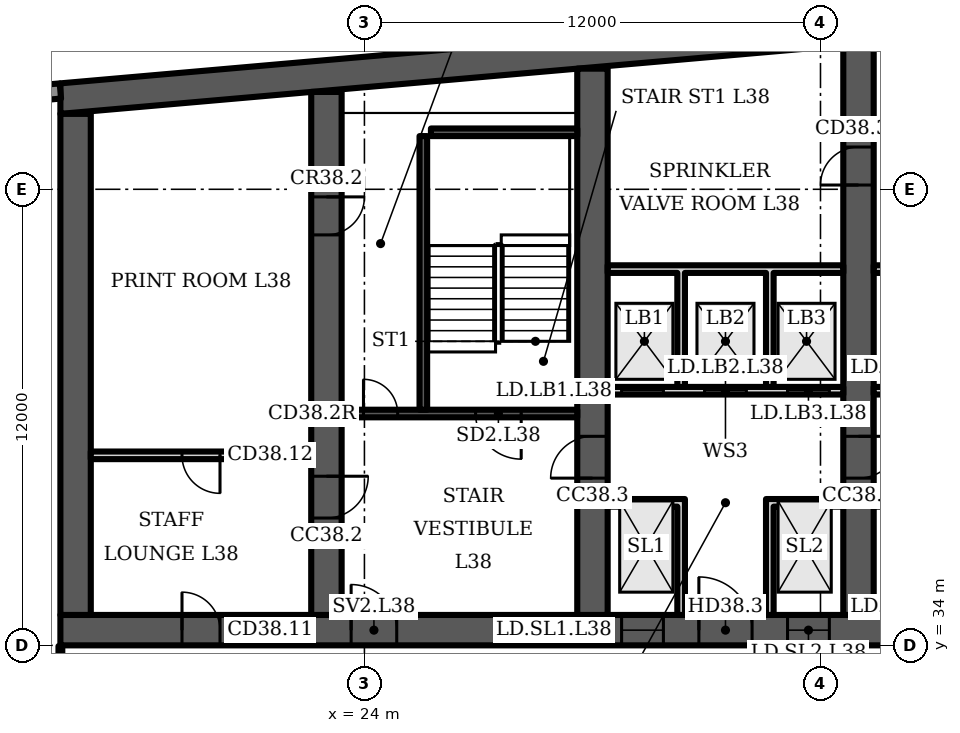
"""IFC4 building model, lengths in metres.
Left out: names, types, materials, properties, quantities, classifications, styles, units other than length and angle.
Written with IfcOpenShell. Run it as: python <this file> out.ifc"""

import sys

from ifc_helpers import new_model, si_unit, direction, frame, frame_2d, origin, place, context, subcontext, project, spatial, polyline, rectangle, outline, extrude, element, fill, save


model = new_model("IFC4")
c1 = context("Model", 3, precision=1e-05, world=origin(), true_north=direction((0.0, 1.0)))
c2 = subcontext(c1, "Body", "Model", "MODEL_VIEW")
j1 = project(units=[si_unit("LENGTHUNIT", "METRE"), si_unit("PLANEANGLEUNIT", "RADIAN")], contexts=[c1])
p1 = place(None, origin())
s1 = spatial("IfcSite", under=j1, at=p1, CompositionType="ELEMENT")
p2 = place(p1, origin())
s2 = spatial("IfcBuilding", under=s1, at=p2, CompositionType="ELEMENT")
p3 = place(p2, frame((0.0, 0.0, 159.1)))
s3 = spatial("IfcBuildingStorey", under=s2, at=p3, CompositionType="ELEMENT", Elevation=159.1)
p4 = place(p3, frame((0.0, 0.0, -0.0)))
e1 = element("IfcWall", 1, at=p4, inside=s3, PredefinedType="SHEAR", context=c2, shape_type="SweptSolid", body=[
    extrude(outline(polyline([(16.0, 47.984), (37.0, 49.822), (58.0, 47.984), (58.0, 48.787), (37.0, 50.625), (16.0, 48.787), (16.0, 47.984)])), origin(), (0.0, 0.0, 1.0), 3.6),
])
p5 = place(p3, frame((16.0, 34.4, 0.0), z_axis=(0.0, 0.0, 1.0), x_axis=(1.0, 0.0, 0.0)))
e2 = element("IfcWall", 2, at=p5, inside=s3, PredefinedType="SHEAR", context=c2, shape_type="SweptSolid", body=[
    extrude(rectangle(XDim=42.0, YDim=0.8, at=frame_2d((21.0, 0.0))), origin(), (0.0, 0.0, 1.0), 3.6),
])
p6 = place(p5, frame((3.2, 0.0, 0.0)))
e3 = element("IfcOpeningElement", 3, at=p6, cuts=e2, PredefinedType="OPENING", context=c2, shape_type="SweptSolid", body=[
    extrude(rectangle(XDim=1.0, YDim=2.1, at=frame_2d((0.5, 1.05))), frame((0.0, 0.41, 0.0), z_axis=(0.0, -1.0, 0.0), x_axis=(1.0, 0.0, 0.0)), (0.0, 0.0, 1.0), 0.82),
])
p7 = place(p5, frame((7.65, 0.0, 0.0)))
e4 = element("IfcOpeningElement", 4, at=p7, cuts=e2, PredefinedType="OPENING", context=c2, shape_type="SweptSolid", body=[
    extrude(rectangle(XDim=1.2, YDim=2.1, at=frame_2d((0.6, 1.05))), frame((0.0, 0.41, 0.0), z_axis=(0.0, -1.0, 0.0), x_axis=(1.0, 0.0, 0.0)), (0.0, 0.0, 1.0), 0.82),
])
p8 = place(p5, frame((14.767, 0.0, 0.0)))
e5 = element("IfcOpeningElement", 5, at=p8, cuts=e2, PredefinedType="OPENING", context=c2, shape_type="SweptSolid", body=[
    extrude(rectangle(XDim=1.1, YDim=2.1, at=frame_2d((0.55, 1.05))), frame((0.0, 0.41, 0.0), z_axis=(0.0, -1.0, 0.0), x_axis=(1.0, 0.0, 0.0)), (0.0, 0.0, 1.0), 0.82),
])
p9 = place(p5, frame((19.133, 0.0, 0.0)))
e6 = element("IfcOpeningElement", 6, at=p9, cuts=e2, PredefinedType="OPENING", context=c2, shape_type="SweptSolid", body=[
    extrude(rectangle(XDim=1.1, YDim=2.1, at=frame_2d((0.55, 1.05))), frame((0.0, 0.41, 0.0), z_axis=(0.0, -1.0, 0.0), x_axis=(1.0, 0.0, 0.0)), (0.0, 0.0, 1.0), 0.82),
])
p10 = place(p5, frame((16.8, 0.0, 0.0)))
e7 = element("IfcOpeningElement", 7, at=p10, cuts=e2, PredefinedType="OPENING", context=c2, shape_type="SweptSolid", body=[
    extrude(rectangle(XDim=1.4, YDim=2.1, at=frame_2d((0.7, 1.05))), frame((0.0, 0.41, 0.0), z_axis=(0.0, -1.0, 0.0), x_axis=(1.0, 0.0, 0.0)), (0.0, 0.0, 1.0), 0.82),
])
p11 = place(p5, frame((21.767, 0.0, 0.0)))
e8 = element("IfcOpeningElement", 8, at=p11, cuts=e2, PredefinedType="OPENING", context=c2, shape_type="SweptSolid", body=[
    extrude(rectangle(XDim=1.1, YDim=2.1, at=frame_2d((0.55, 1.05))), frame((0.0, 0.41, 0.0), z_axis=(0.0, -1.0, 0.0), x_axis=(1.0, 0.0, 0.0)), (0.0, 0.0, 1.0), 0.82),
])
p12 = place(p5, frame((23.95, 0.0, 0.0)))
e9 = element("IfcOpeningElement", 9, at=p12, cuts=e2, PredefinedType="OPENING", context=c2, shape_type="SweptSolid", body=[
    extrude(rectangle(XDim=1.1, YDim=2.1, at=frame_2d((0.55, 1.05))), frame((0.0, 0.41, 0.0), z_axis=(0.0, -1.0, 0.0), x_axis=(1.0, 0.0, 0.0)), (0.0, 0.0, 1.0), 0.82),
])
p13 = place(p5, frame((26.133, 0.0, 0.0)))
e10 = element("IfcOpeningElement", 10, at=p13, cuts=e2, PredefinedType="OPENING", context=c2, shape_type="SweptSolid", body=[
    extrude(rectangle(XDim=1.1, YDim=2.1, at=frame_2d((0.55, 1.05))), frame((0.0, 0.41, 0.0), z_axis=(0.0, -1.0, 0.0), x_axis=(1.0, 0.0, 0.0)), (0.0, 0.0, 1.0), 0.82),
])
p14 = place(p5, frame((33.15, 0.0, 0.0)))
e11 = element("IfcOpeningElement", 11, at=p14, cuts=e2, PredefinedType="OPENING", context=c2, shape_type="SweptSolid", body=[
    extrude(rectangle(XDim=1.2, YDim=2.1, at=frame_2d((0.6, 1.05))), frame((0.0, 0.41, 0.0), z_axis=(0.0, -1.0, 0.0), x_axis=(1.0, 0.0, 0.0)), (0.0, 0.0, 1.0), 0.82),
])
p15 = place(p5, frame((37.767, 0.0, 0.0)))
e12 = element("IfcOpeningElement", 12, at=p15, cuts=e2, PredefinedType="OPENING", context=c2, shape_type="SweptSolid", body=[
    extrude(rectangle(XDim=1.4, YDim=2.1, at=frame_2d((0.7, 1.05))), frame((0.0, 0.41, 0.0), z_axis=(0.0, -1.0, 0.0), x_axis=(1.0, 0.0, 0.0)), (0.0, 0.0, 1.0), 0.82),
])
p16 = place(p3, frame((16.4, 34.8, 0.0), z_axis=(0.0, 0.0, 1.0), x_axis=(0.0, 1.0, 0.0)))
e13 = element("IfcWall", 13, at=p16, inside=s3, PredefinedType="SHEAR", context=c2, shape_type="SweptSolid", body=[
    extrude(rectangle(XDim=13.184, YDim=0.8, at=frame_2d((6.592, 0.0))), origin(), (0.0, 0.0, 1.0), 3.6),
])
p17 = place(p3, frame((23.0, 34.8, 0.0), z_axis=(0.0, 0.0, 1.0), x_axis=(0.0, 1.0, 0.0)))
e14 = element("IfcWall", 14, at=p17, inside=s3, PredefinedType="SHEAR", context=c2, shape_type="SweptSolid", body=[
    extrude(rectangle(XDim=13.762, YDim=0.8, at=frame_2d((6.881, 0.0))), origin(), (0.0, 0.0, 1.0), 3.6),
])
p18 = place(p17, frame((2.55, 0.0, 0.0)))
e15 = element("IfcOpeningElement", 15, at=p18, cuts=e14, PredefinedType="OPENING", context=c2, shape_type="SweptSolid", body=[
    extrude(rectangle(XDim=1.1, YDim=2.1, at=frame_2d((0.55, 1.05))), frame((0.0, 0.41, 0.0), z_axis=(0.0, -1.0, 0.0), x_axis=(1.0, 0.0, 0.0)), (0.0, 0.0, 1.0), 0.82),
])
p19 = place(p17, frame((10.0, 0.0, 0.0)))
e16 = element("IfcOpeningElement", 16, at=p19, cuts=e14, PredefinedType="OPENING", context=c2, shape_type="SweptSolid", body=[
    extrude(rectangle(XDim=1.0, YDim=2.1, at=frame_2d((0.5, 1.05))), frame((0.0, 0.41, 0.0), z_axis=(0.0, -1.0, 0.0), x_axis=(1.0, 0.0, 0.0)), (0.0, 0.0, 1.0), 0.82),
])
p20 = place(p3, frame((30.0, 34.8, 0.0), z_axis=(0.0, 0.0, 1.0), x_axis=(0.0, 1.0, 0.0)))
e17 = element("IfcWall", 17, at=p20, inside=s3, PredefinedType="SHEAR", context=c2, shape_type="SweptSolid", body=[
    extrude(rectangle(XDim=14.374, YDim=0.8, at=frame_2d((7.187, 0.0))), origin(), (0.0, 0.0, 1.0), 3.6),
])
p21 = place(p20, frame((3.6, 0.0, 0.0)))
e18 = element("IfcOpeningElement", 18, at=p21, cuts=e17, PredefinedType="OPENING", context=c2, shape_type="SweptSolid", body=[
    extrude(rectangle(XDim=1.1, YDim=2.1, at=frame_2d((0.55, 1.05))), frame((0.0, 0.41, 0.0), z_axis=(0.0, -1.0, 0.0), x_axis=(1.0, 0.0, 0.0)), (0.0, 0.0, 1.0), 0.82),
])
p22 = place(p3, frame((37.0, 34.8, 0.0), z_axis=(0.0, 0.0, 1.0), x_axis=(0.0, 1.0, 0.0)))
e19 = element("IfcWall", 19, at=p22, inside=s3, PredefinedType="SHEAR", context=c2, shape_type="SweptSolid", body=[
    extrude(rectangle(XDim=14.987, YDim=0.8, at=frame_2d((7.493, 0.0))), origin(), (0.0, 0.0, 1.0), 3.6),
])
p23 = place(p22, frame((11.312, 0.0, 0.0)))
e20 = element("IfcOpeningElement", 20, at=p23, cuts=e19, PredefinedType="OPENING", context=c2, shape_type="SweptSolid", body=[
    extrude(rectangle(XDim=1.0, YDim=2.1, at=frame_2d((0.5, 1.05))), frame((0.0, 0.41, 0.0), z_axis=(0.0, -1.0, 0.0), x_axis=(1.0, 0.0, 0.0)), (0.0, 0.0, 1.0), 0.82),
])
p24 = place(p22, frame((3.6, 0.0, 0.0)))
e21 = element("IfcOpeningElement", 21, at=p24, cuts=e19, PredefinedType="OPENING", context=c2, shape_type="SweptSolid", body=[
    extrude(rectangle(XDim=1.1, YDim=2.1, at=frame_2d((0.55, 1.05))), frame((0.0, 0.41, 0.0), z_axis=(0.0, -1.0, 0.0), x_axis=(1.0, 0.0, 0.0)), (0.0, 0.0, 1.0), 0.82),
])
p25 = place(p3, frame((16.0, 48.587, 0.0), z_axis=(0.0, 0.0, 1.0), x_axis=(-0.996194, -0.087168, 0.0)))
e22 = element("IfcWall", 22, at=p25, inside=s3, PredefinedType="SOLIDWALL", context=c2, shape_type="SweptSolid", body=[
    extrude(rectangle(XDim=2.994, YDim=0.4, at=frame_2d((1.497, 0.0))), origin(), (0.0, 0.0, 1.0), 3.2),
])
p26 = place(p3, frame((16.8, 39.0, 0.0), z_axis=(0.0, 0.0, 1.0), x_axis=(1.0, 0.0, 0.0)))
e23 = element("IfcWall", 23, at=p26, inside=s3, PredefinedType="PARTITIONING", context=c2, shape_type="SweptSolid", body=[
    extrude(rectangle(XDim=5.8, YDim=0.2, at=frame_2d((2.9, 0.0))), origin(), (0.0, 0.0, 1.0), 3.2),
])
p27 = place(p26, frame((2.4, 0.0, 0.0)))
e24 = element("IfcOpeningElement", 24, at=p27, cuts=e23, PredefinedType="OPENING", context=c2, shape_type="SweptSolid", body=[
    extrude(rectangle(XDim=1.0, YDim=2.1, at=frame_2d((0.5, 1.05))), frame((0.0, 0.11, 0.0), z_axis=(0.0, -1.0, 0.0), x_axis=(1.0, 0.0, 0.0)), (0.0, 0.0, 1.0), 0.22),
])
p28 = place(p3, frame((23.4, 40.1, 0.0), z_axis=(0.0, 0.0, 1.0), x_axis=(1.0, 0.0, 0.0)))
e25 = element("IfcWall", 25, at=p28, inside=s3, PredefinedType="SHEAR", context=c2, shape_type="SweptSolid", body=[
    extrude(rectangle(XDim=6.2, YDim=0.2, at=frame_2d((3.1, 0.0))), origin(), (0.0, 0.0, 1.0), 3.2),
])
p29 = place(p28, frame((3.525, 0.0, 0.0)))
e26 = element("IfcOpeningElement", 26, at=p29, cuts=e25, PredefinedType="OPENING", context=c2, shape_type="SweptSolid", body=[
    extrude(rectangle(XDim=1.2, YDim=2.1, at=frame_2d((0.6, 1.05))), frame((0.0, 0.11, 0.0), z_axis=(0.0, -1.0, 0.0), x_axis=(1.0, 0.0, 0.0)), (0.0, 0.0, 1.0), 0.22),
])
p30 = place(p28, frame((0.575, 0.0, 0.0)))
e27 = element("IfcOpeningElement", 27, at=p30, cuts=e25, PredefinedType="OPENING", context=c2, shape_type="SweptSolid", body=[
    extrude(rectangle(XDim=0.9, YDim=2.1, at=frame_2d((0.45, 1.05))), frame((0.0, 0.11, 0.0), z_axis=(0.0, -1.0, 0.0), x_axis=(1.0, 0.0, 0.0)), (0.0, 0.0, 1.0), 0.22),
])
p31 = place(p3, frame((25.55, 40.2, 0.0), z_axis=(0.0, 0.0, 1.0), x_axis=(0.0, 1.0, 0.0)))
e28 = element("IfcWall", 28, at=p31, inside=s3, PredefinedType="SHEAR", context=c2, shape_type="SweptSolid", body=[
    extrude(rectangle(XDim=7.2, YDim=0.2, at=frame_2d((3.6, 0.0))), origin(), (0.0, 0.0, 1.0), 3.2),
])
p32 = place(p3, frame((25.75, 47.5, 0.0), z_axis=(0.0, 0.0, 1.0), x_axis=(1.0, 0.0, 0.0)))
e29 = element("IfcWall", 29, at=p32, inside=s3, PredefinedType="SHEAR", context=c2, shape_type="SweptSolid", body=[
    extrude(rectangle(XDim=3.85, YDim=0.2, at=frame_2d((1.925, 0.0))), origin(), (0.0, 0.0, 1.0), 3.2),
])
p33 = place(p3, frame((30.4, 40.7, 0.0), z_axis=(0.0, 0.0, 1.0), x_axis=(1.0, 0.0, 0.0)))
e30 = element("IfcWall", 30, at=p33, inside=s3, PredefinedType="PARTITIONING", context=c2, shape_type="SweptSolid", body=[
    extrude(rectangle(XDim=6.2, YDim=0.2, at=frame_2d((3.1, 0.0))), origin(), (0.0, 0.0, 1.0), 3.2),
])
p34 = place(p33, frame((0.367, 0.0, 0.0)))
e31 = element("IfcOpeningElement", 31, at=p34, cuts=e30, PredefinedType="OPENING", context=c2, shape_type="SweptSolid", body=[
    extrude(rectangle(XDim=1.1, YDim=2.1, at=frame_2d((0.55, 1.05))), frame((0.0, 0.11, 0.0), z_axis=(0.0, -1.0, 0.0), x_axis=(1.0, 0.0, 0.0)), (0.0, 0.0, 1.0), 0.22),
])
p35 = place(p33, frame((2.55, 0.0, 0.0)))
e32 = element("IfcOpeningElement", 32, at=p35, cuts=e30, PredefinedType="OPENING", context=c2, shape_type="SweptSolid", body=[
    extrude(rectangle(XDim=1.1, YDim=2.1, at=frame_2d((0.55, 1.05))), frame((0.0, 0.11, 0.0), z_axis=(0.0, -1.0, 0.0), x_axis=(1.0, 0.0, 0.0)), (0.0, 0.0, 1.0), 0.22),
])
p36 = place(p33, frame((4.733, 0.0, 0.0)))
e33 = element("IfcOpeningElement", 33, at=p36, cuts=e30, PredefinedType="OPENING", context=c2, shape_type="SweptSolid", body=[
    extrude(rectangle(XDim=1.1, YDim=2.1, at=frame_2d((0.55, 1.05))), frame((0.0, 0.11, 0.0), z_axis=(0.0, -1.0, 0.0), x_axis=(1.0, 0.0, 0.0)), (0.0, 0.0, 1.0), 0.22),
])
p37 = place(p3, frame((0.0, 0.0, -0.0)))
e34 = element("IfcWall", 34, at=p37, inside=s3, PredefinedType="PARTITIONING", context=c2, shape_type="SweptSolid", body=[
    extrude(outline(polyline([(32.233, 37.65), (30.4, 37.65), (30.4, 37.85), (32.233, 37.85), (32.433, 37.85), (32.433, 34.8), (32.233, 34.8), (32.233, 37.65)])), origin(), (0.0, 0.0, 1.0), 3.2),
])
p38 = place(p3, frame((0.0, 0.0, -0.0)))
e35 = element("IfcWall", 35, at=p38, inside=s3, PredefinedType="PARTITIONING", context=c2, shape_type="SweptSolid", body=[
    extrude(outline(polyline([(34.567, 37.85), (34.767, 37.85), (36.6, 37.85), (36.6, 37.65), (34.767, 37.65), (34.767, 34.8), (34.567, 34.8), (34.567, 37.85)])), origin(), (0.0, 0.0, 1.0), 3.2),
])
p39 = place(p3, frame((0.0, 0.0, -0.0)))
e36 = element("IfcWall", 36, at=p39, inside=s3, PredefinedType="PARTITIONING", context=c2, shape_type="SweptSolid", body=[
    extrude(outline(polyline([(32.433, 40.8), (32.233, 40.8), (32.233, 43.8), (30.4, 43.8), (30.4, 44.0), (36.6, 44.0), (36.6, 43.8), (34.767, 43.8), (34.767, 40.8), (34.567, 40.8), (34.567, 43.8), (32.433, 43.8), (32.433, 40.8)])), origin(), (0.0, 0.0, 1.0), 3.2),
])
p40 = place(p3, frame((37.4, 40.7, 0.0), z_axis=(0.0, 0.0, 1.0), x_axis=(1.0, 0.0, 0.0)))
e37 = element("IfcWall", 37, at=p40, inside=s3, PredefinedType="PARTITIONING", context=c2, shape_type="SweptSolid", body=[
    extrude(rectangle(XDim=6.2, YDim=0.2, at=frame_2d((3.1, 0.0))), origin(), (0.0, 0.0, 1.0), 3.2),
])
p41 = place(p40, frame((0.367, 0.0, 0.0)))
e38 = element("IfcOpeningElement", 38, at=p41, cuts=e37, PredefinedType="OPENING", context=c2, shape_type="SweptSolid", body=[
    extrude(rectangle(XDim=1.1, YDim=2.1, at=frame_2d((0.55, 1.05))), frame((0.0, 0.11, 0.0), z_axis=(0.0, -1.0, 0.0), x_axis=(1.0, 0.0, 0.0)), (0.0, 0.0, 1.0), 0.22),
])
p42 = place(p40, frame((2.55, 0.0, 0.0)))
e39 = element("IfcOpeningElement", 39, at=p42, cuts=e37, PredefinedType="OPENING", context=c2, shape_type="SweptSolid", body=[
    extrude(rectangle(XDim=1.1, YDim=2.1, at=frame_2d((0.55, 1.05))), frame((0.0, 0.11, 0.0), z_axis=(0.0, -1.0, 0.0), x_axis=(1.0, 0.0, 0.0)), (0.0, 0.0, 1.0), 0.22),
])
p43 = place(p40, frame((4.733, 0.0, 0.0)))
e40 = element("IfcOpeningElement", 40, at=p43, cuts=e37, PredefinedType="OPENING", context=c2, shape_type="SweptSolid", body=[
    extrude(rectangle(XDim=1.1, YDim=2.1, at=frame_2d((0.55, 1.05))), frame((0.0, 0.11, 0.0), z_axis=(0.0, -1.0, 0.0), x_axis=(1.0, 0.0, 0.0)), (0.0, 0.0, 1.0), 0.22),
])
p44 = place(p3, frame((0.0, 0.0, -0.0)))
e41 = element("IfcWall", 41, at=p44, inside=s3, PredefinedType="PARTITIONING", context=c2, shape_type="SweptSolid", body=[
    extrude(outline(polyline([(41.567, 37.1), (39.433, 37.1), (39.433, 34.8), (39.233, 34.8), (39.233, 37.65), (37.4, 37.65), (37.4, 37.85), (39.233, 37.85), (39.433, 37.85), (39.433, 37.3), (41.567, 37.3), (41.567, 37.55), (41.767, 37.55), (43.6, 37.55), (43.6, 37.35), (41.767, 37.35), (41.767, 34.8), (41.567, 34.8), (41.567, 37.1)])), origin(), (0.0, 0.0, 1.0), 3.2),
])
p45 = place(p3, frame((0.0, 0.0, -0.0)))
e42 = element("IfcWall", 42, at=p45, inside=s3, PredefinedType="PARTITIONING", context=c2, shape_type="SweptSolid", body=[
    extrude(outline(polyline([(39.433, 40.8), (39.233, 40.8), (39.233, 43.8), (37.4, 43.8), (37.4, 44.0), (43.6, 44.0), (43.6, 43.8), (41.767, 43.8), (41.767, 40.8), (41.567, 40.8), (41.567, 43.8), (39.433, 43.8), (39.433, 40.8)])), origin(), (0.0, 0.0, 1.0), 3.2),
])
p46 = place(p3, frame((37.0, 30.5, 0.0), z_axis=(0.0, 0.0, 1.0), x_axis=(0.0, 1.0, 0.0)))
e43 = element("IfcWall", 43, at=p46, inside=s3, PredefinedType="PARTITIONING", context=c2, shape_type="SweptSolid", body=[
    extrude(rectangle(XDim=3.5, YDim=0.2, at=frame_2d((1.75, 0.0))), origin(), (0.0, 0.0, 1.0), 3.2),
])
p47 = place(p46, frame((1.2, 0.0, 0.0)))
e44 = element("IfcOpeningElement", 44, at=p47, cuts=e43, PredefinedType="OPENING", context=c2, shape_type="SweptSolid", body=[
    extrude(rectangle(XDim=1.1, YDim=2.1, at=frame_2d((0.55, 1.05))), frame((0.0, 0.11, 0.0), z_axis=(0.0, -1.0, 0.0), x_axis=(1.0, 0.0, 0.0)), (0.0, 0.0, 1.0), 0.22),
])
p48 = place(p3, frame((16.0, 30.5, 0.0), z_axis=(0.0, 0.0, 1.0), x_axis=(0.0, 1.0, 0.0)))
e45 = element("IfcWall", 45, at=p48, inside=s3, PredefinedType="PARTITIONING", context=c2, shape_type="SweptSolid", body=[
    extrude(rectangle(XDim=3.48, YDim=0.1, at=frame_2d((1.74, 0.0))), origin(), (0.0, 0.0, 1.0), 3.2),
])
p49 = place(p6, origin())
e46 = element("IfcDoor", 46, at=p49, inside=s3, OperationType="SINGLE_SWING_LEFT", PredefinedType="DOOR", context=c2, shape_type="SweptSolid", body=[
    extrude(rectangle(XDim=1.0, YDim=2.1, at=frame_2d((0.5, 1.05))), frame((0.0, 0.4, 0.0), z_axis=(0.0, -1.0, 0.0), x_axis=(1.0, 0.0, 0.0)), (0.0, 0.0, 1.0), 0.8),
])
fill(e3, e46)
p50 = place(p27, origin())
e47 = element("IfcDoor", 47, at=p50, inside=s3, OperationType="SINGLE_SWING_RIGHT", PredefinedType="DOOR", context=c2, shape_type="SweptSolid", body=[
    extrude(rectangle(XDim=1.0, YDim=2.1, at=frame_2d((0.5, 1.05))), frame((0.0, 0.025, 0.0), z_axis=(0.0, -1.0, 0.0), x_axis=(1.0, 0.0, 0.0)), (0.0, 0.0, 1.0), 0.05),
])
fill(e24, e47)
p51 = place(p29, origin())
e48 = element("IfcDoor", 48, at=p51, inside=s3, OperationType="SINGLE_SWING_RIGHT", PredefinedType="DOOR", context=c2, shape_type="SweptSolid", body=[
    extrude(rectangle(XDim=1.2, YDim=2.1, at=frame_2d((0.6, 1.05))), frame((0.0, 0.025, 0.0), z_axis=(0.0, -1.0, 0.0), x_axis=(1.0, 0.0, 0.0)), (0.0, 0.0, 1.0), 0.05),
])
fill(e26, e48)
p52 = place(p30, origin())
e49 = element("IfcDoor", 49, at=p52, inside=s3, OperationType="SINGLE_SWING_LEFT", PredefinedType="DOOR", context=c2, shape_type="SweptSolid", body=[
    extrude(rectangle(XDim=0.9, YDim=2.1, at=frame_2d((0.45, 1.05))), frame((0.0, 0.025, 0.0), z_axis=(0.0, -1.0, 0.0), x_axis=(1.0, 0.0, 0.0)), (0.0, 0.0, 1.0), 0.05),
])
fill(e27, e49)
p53 = place(p7, origin())
e50 = element("IfcDoor", 50, at=p53, inside=s3, OperationType="SINGLE_SWING_LEFT", PredefinedType="DOOR", context=c2, shape_type="SweptSolid", body=[
    extrude(rectangle(XDim=1.2, YDim=2.1, at=frame_2d((0.6, 1.05))), frame((0.0, 0.025, 0.0), z_axis=(0.0, -1.0, 0.0), x_axis=(1.0, 0.0, 0.0)), (0.0, 0.0, 1.0), 0.05),
])
fill(e4, e50)
p54 = place(p8, origin())
e51 = element("IfcDoor", 51, at=p54, inside=s3, OperationType="DOUBLE_DOOR_SLIDING", PredefinedType="DOOR", context=c2, shape_type="SweptSolid", body=[
    extrude(rectangle(XDim=1.1, YDim=2.1, at=frame_2d((0.55, 1.05))), frame((0.0, 0.025, 0.0), z_axis=(0.0, -1.0, 0.0), x_axis=(1.0, 0.0, 0.0)), (0.0, 0.0, 1.0), 0.05),
])
fill(e5, e51)
p55 = place(p9, origin())
e52 = element("IfcDoor", 52, at=p55, inside=s3, OperationType="DOUBLE_DOOR_SLIDING", PredefinedType="DOOR", context=c2, shape_type="SweptSolid", body=[
    extrude(rectangle(XDim=1.1, YDim=2.1, at=frame_2d((0.55, 1.05))), frame((0.0, 0.025, 0.0), z_axis=(0.0, -1.0, 0.0), x_axis=(1.0, 0.0, 0.0)), (0.0, 0.0, 1.0), 0.05),
])
fill(e6, e52)
p56 = place(p10, origin())
e53 = element("IfcDoor", 53, at=p56, inside=s3, OperationType="DOUBLE_DOOR_SINGLE_SWING", PredefinedType="DOOR", context=c2, shape_type="SweptSolid", body=[
    extrude(rectangle(XDim=1.4, YDim=2.1, at=frame_2d((0.7, 1.05))), frame((0.0, 0.025, 0.0), z_axis=(0.0, -1.0, 0.0), x_axis=(1.0, 0.0, 0.0)), (0.0, 0.0, 1.0), 0.05),
])
fill(e7, e53)
p57 = place(p34, origin())
e54 = element("IfcDoor", 54, at=p57, inside=s3, OperationType="DOUBLE_DOOR_SLIDING", PredefinedType="DOOR", context=c2, shape_type="SweptSolid", body=[
    extrude(rectangle(XDim=1.1, YDim=2.1, at=frame_2d((0.55, 1.05))), frame((0.0, 0.025, 0.0), z_axis=(0.0, -1.0, 0.0), x_axis=(1.0, 0.0, 0.0)), (0.0, 0.0, 1.0), 0.05),
])
fill(e31, e54)
p58 = place(p35, origin())
e55 = element("IfcDoor", 55, at=p58, inside=s3, OperationType="DOUBLE_DOOR_SLIDING", PredefinedType="DOOR", context=c2, shape_type="SweptSolid", body=[
    extrude(rectangle(XDim=1.1, YDim=2.1, at=frame_2d((0.55, 1.05))), frame((0.0, 0.025, 0.0), z_axis=(0.0, -1.0, 0.0), x_axis=(1.0, 0.0, 0.0)), (0.0, 0.0, 1.0), 0.05),
])
fill(e32, e55)
p59 = place(p36, origin())
e56 = element("IfcDoor", 56, at=p59, inside=s3, OperationType="DOUBLE_DOOR_SLIDING", PredefinedType="DOOR", context=c2, shape_type="SweptSolid", body=[
    extrude(rectangle(XDim=1.1, YDim=2.1, at=frame_2d((0.55, 1.05))), frame((0.0, 0.025, 0.0), z_axis=(0.0, -1.0, 0.0), x_axis=(1.0, 0.0, 0.0)), (0.0, 0.0, 1.0), 0.05),
])
fill(e33, e56)
p60 = place(p23, origin())
e57 = element("IfcDoor", 57, at=p60, inside=s3, OperationType="SINGLE_SWING_LEFT", PredefinedType="DOOR", context=c2, shape_type="SweptSolid", body=[
    extrude(rectangle(XDim=1.0, YDim=2.1, at=frame_2d((0.5, 1.05))), frame((0.0, 0.4, 0.0), z_axis=(0.0, -1.0, 0.0), x_axis=(1.0, 0.0, 0.0)), (0.0, 0.0, 1.0), 0.8),
])
fill(e20, e57)
p61 = place(p18, origin())
e58 = element("IfcDoor", 58, at=p61, inside=s3, OperationType="SINGLE_SWING_RIGHT", PredefinedType="DOOR", context=c2, shape_type="SweptSolid", body=[
    extrude(rectangle(XDim=1.1, YDim=2.1, at=frame_2d((0.55, 1.05))), frame((0.0, 0.025, 0.0), z_axis=(0.0, -1.0, 0.0), x_axis=(1.0, 0.0, 0.0)), (0.0, 0.0, 1.0), 0.05),
])
fill(e15, e58)
p62 = place(p19, origin())
e59 = element("IfcDoor", 59, at=p62, inside=s3, OperationType="SINGLE_SWING_RIGHT", PredefinedType="DOOR", context=c2, shape_type="SweptSolid", body=[
    extrude(rectangle(XDim=1.0, YDim=2.1, at=frame_2d((0.5, 1.05))), frame((0.0, 0.4, 0.0), z_axis=(0.0, -1.0, 0.0), x_axis=(1.0, 0.0, 0.0)), (0.0, 0.0, 1.0), 0.8),
])
fill(e16, e59)
p63 = place(p21, origin())
e60 = element("IfcDoor", 60, at=p63, inside=s3, OperationType="SINGLE_SWING_LEFT", PredefinedType="DOOR", context=c2, shape_type="SweptSolid", body=[
    extrude(rectangle(XDim=1.1, YDim=2.1, at=frame_2d((0.55, 1.05))), frame((0.0, 0.025, 0.0), z_axis=(0.0, -1.0, 0.0), x_axis=(1.0, 0.0, 0.0)), (0.0, 0.0, 1.0), 0.05),
])
fill(e18, e60)
p64 = place(p24, origin())
e61 = element("IfcDoor", 61, at=p64, inside=s3, OperationType="SINGLE_SWING_RIGHT", PredefinedType="DOOR", context=c2, shape_type="SweptSolid", body=[
    extrude(rectangle(XDim=1.1, YDim=2.1, at=frame_2d((0.55, 1.05))), frame((0.0, 0.025, 0.0), z_axis=(0.0, -1.0, 0.0), x_axis=(1.0, 0.0, 0.0)), (0.0, 0.0, 1.0), 0.05),
])
fill(e21, e61)
save(model, sys.argv[1])
